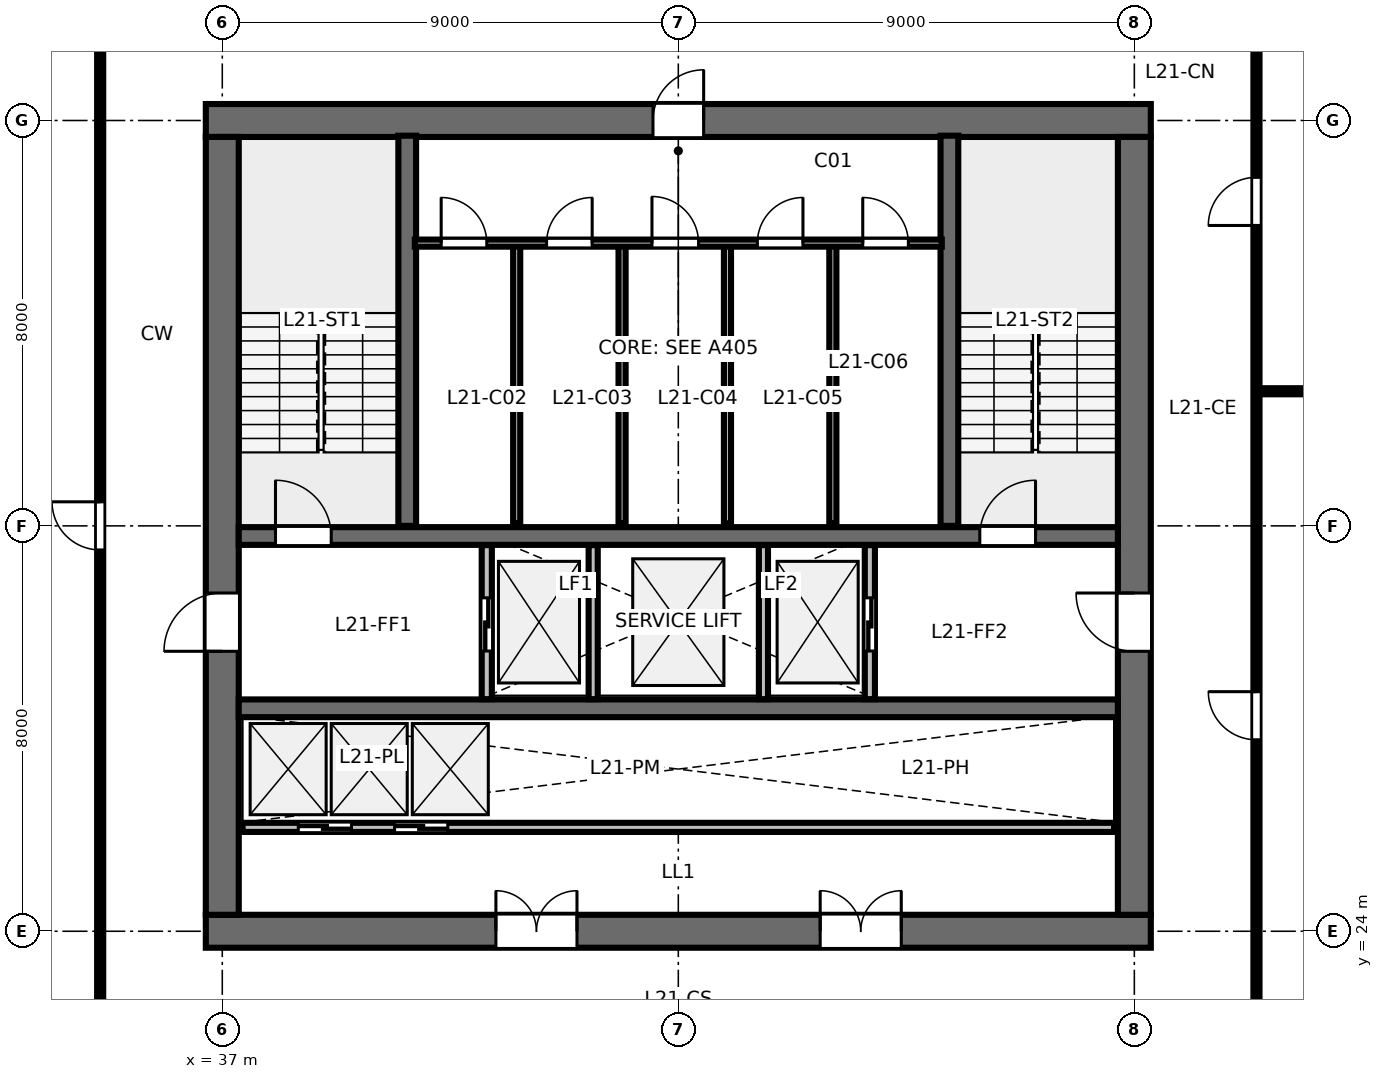
"""IFC4 building model, lengths in metres.
Left out: names, types, materials, properties, quantities, classifications, styles, units other than length and angle.
Written with IfcOpenShell. Run it as: python <this file> out.ifc"""

import sys

from ifc_helpers import new_model, si_unit, direction, frame, frame_2d, origin, place, context, subcontext, project, spatial, rectangle, extrude, element, fill, save


model = new_model("IFC4")
c1 = context("Model", 3, precision=1e-05, world=origin(), true_north=direction((0.0, 1.0)))
c2 = subcontext(c1, "Body", "Model", "MODEL_VIEW")
j1 = project(units=[si_unit("LENGTHUNIT", "METRE"), si_unit("PLANEANGLEUNIT", "RADIAN")], contexts=[c1])
p1 = place(None, origin())
s1 = spatial("IfcSite", under=j1, at=p1, CompositionType="ELEMENT")
p2 = place(p1, origin())
s2 = spatial("IfcBuilding", under=s1, at=p2, CompositionType="ELEMENT")
p3 = place(p2, frame((0.0, 0.0, 82.0)))
s3 = spatial("IfcBuildingStorey", under=s2, at=p3, CompositionType="ELEMENT", Elevation=82.0)
p4 = place(p3, frame((36.675, 24.0, 0.0), z_axis=(0.0, 0.0, 1.0), x_axis=(1.0, 0.0, 0.0)))
e1 = element("IfcWall", 1, at=p4, inside=s3, PredefinedType="SHEAR", context=c2, shape_type="SweptSolid", body=[
    extrude(rectangle(XDim=18.65, YDim=0.65, at=frame_2d((9.325, 0.0))), origin(), (0.0, 0.0, 1.0), 3.28),
])
p5 = place(p4, frame((5.725, 0.0, 0.0)))
e2 = element("IfcOpeningElement", 2, at=p5, cuts=e1, PredefinedType="OPENING", context=c2, shape_type="SweptSolid", body=[
    extrude(rectangle(XDim=1.6, YDim=2.15, at=frame_2d((0.8, 1.075))), frame((0.0, 0.335, 0.0), z_axis=(0.0, -1.0, 0.0), x_axis=(1.0, 0.0, 0.0)), (0.0, 0.0, 1.0), 0.67),
])
p6 = place(p4, frame((12.125, 0.0, 0.0)))
e3 = element("IfcOpeningElement", 3, at=p6, cuts=e1, PredefinedType="OPENING", context=c2, shape_type="SweptSolid", body=[
    extrude(rectangle(XDim=1.6, YDim=2.15, at=frame_2d((0.8, 1.075))), frame((0.0, 0.335, 0.0), z_axis=(0.0, -1.0, 0.0), x_axis=(1.0, 0.0, 0.0)), (0.0, 0.0, 1.0), 0.67),
])
p7 = place(p3, frame((36.675, 40.0, 0.0), z_axis=(0.0, 0.0, 1.0), x_axis=(1.0, 0.0, 0.0)))
e4 = element("IfcWall", 4, at=p7, inside=s3, PredefinedType="SHEAR", context=c2, shape_type="SweptSolid", body=[
    extrude(rectangle(XDim=18.65, YDim=0.65, at=frame_2d((9.325, 0.0))), origin(), (0.0, 0.0, 1.0), 3.28),
])
p8 = place(p7, frame((8.825, 0.0, 0.0)))
e5 = element("IfcOpeningElement", 5, at=p8, cuts=e4, PredefinedType="OPENING", context=c2, shape_type="SweptSolid", body=[
    extrude(rectangle(XDim=1.0, YDim=2.15, at=frame_2d((0.5, 1.075))), frame((0.0, 0.335, 0.0), z_axis=(0.0, -1.0, 0.0), x_axis=(1.0, 0.0, 0.0)), (0.0, 0.0, 1.0), 0.67),
])
p9 = place(p3, frame((37.0, 24.325, 0.0), z_axis=(0.0, 0.0, 1.0), x_axis=(0.0, 1.0, 0.0)))
e6 = element("IfcWall", 6, at=p9, inside=s3, PredefinedType="SHEAR", context=c2, shape_type="SweptSolid", body=[
    extrude(rectangle(XDim=15.35, YDim=0.65, at=frame_2d((7.675, 0.0))), origin(), (0.0, 0.0, 1.0), 3.28),
])
p10 = place(p9, frame((5.2, 0.0, 0.0)))
e7 = element("IfcOpeningElement", 7, at=p10, cuts=e6, PredefinedType="OPENING", context=c2, shape_type="SweptSolid", body=[
    extrude(rectangle(XDim=1.15, YDim=2.15, at=frame_2d((0.575, 1.075))), frame((0.0, 0.335, 0.0), z_axis=(0.0, -1.0, 0.0), x_axis=(1.0, 0.0, 0.0)), (0.0, 0.0, 1.0), 0.67),
])
p11 = place(p3, frame((55.0, 24.325, 0.0), z_axis=(0.0, 0.0, 1.0), x_axis=(0.0, 1.0, 0.0)))
e8 = element("IfcWall", 8, at=p11, inside=s3, PredefinedType="SHEAR", context=c2, shape_type="SweptSolid", body=[
    extrude(rectangle(XDim=15.35, YDim=0.65, at=frame_2d((7.675, 0.0))), origin(), (0.0, 0.0, 1.0), 3.28),
])
p12 = place(p11, frame((5.2, 0.0, 0.0)))
e9 = element("IfcOpeningElement", 9, at=p12, cuts=e8, PredefinedType="OPENING", context=c2, shape_type="SweptSolid", body=[
    extrude(rectangle(XDim=1.15, YDim=2.15, at=frame_2d((0.575, 1.075))), frame((0.0, 0.335, 0.0), z_axis=(0.0, -1.0, 0.0), x_axis=(1.0, 0.0, 0.0)), (0.0, 0.0, 1.0), 0.67),
])
p13 = place(p3, frame((37.325, 31.8, 0.0), z_axis=(0.0, 0.0, 1.0), x_axis=(1.0, 0.0, 0.0)))
e10 = element("IfcWall", 10, at=p13, inside=s3, PredefinedType="SHEAR", context=c2, shape_type="SweptSolid", body=[
    extrude(rectangle(XDim=17.35, YDim=0.35, at=frame_2d((8.675, 0.0))), origin(), (0.0, 0.0, 1.0), 3.28),
])
p14 = place(p13, frame((0.725, 0.0, 0.0)))
e11 = element("IfcOpeningElement", 11, at=p14, cuts=e10, PredefinedType="OPENING", context=c2, shape_type="SweptSolid", body=[
    extrude(rectangle(XDim=1.1, YDim=2.15, at=frame_2d((0.55, 1.075))), frame((0.0, 0.185, 0.0), z_axis=(0.0, -1.0, 0.0), x_axis=(1.0, 0.0, 0.0)), (0.0, 0.0, 1.0), 0.37),
])
p15 = place(p13, frame((14.625, 0.0, 0.0)))
e12 = element("IfcOpeningElement", 12, at=p15, cuts=e10, PredefinedType="OPENING", context=c2, shape_type="SweptSolid", body=[
    extrude(rectangle(XDim=1.1, YDim=2.15, at=frame_2d((0.55, 1.075))), frame((0.0, 0.185, 0.0), z_axis=(0.0, -1.0, 0.0), x_axis=(1.0, 0.0, 0.0)), (0.0, 0.0, 1.0), 0.37),
])
p16 = place(p3, frame((37.325, 28.4, 0.0), z_axis=(0.0, 0.0, 1.0), x_axis=(1.0, 0.0, 0.0)))
e13 = element("IfcWall", 13, at=p16, inside=s3, PredefinedType="SHEAR", context=c2, shape_type="SweptSolid", body=[
    extrude(rectangle(XDim=17.35, YDim=0.35, at=frame_2d((8.675, 0.0))), origin(), (0.0, 0.0, 1.0), 3.28),
])
for number, where, z_axis, x_axis in (
    (14, (40.65, 32.0, 0.0), (0.0, 0.0, 1.0), (0.0, 1.0, 0.0)),
    (15, (51.35, 32.0, 0.0), (0.0, 0.0, 1.0), (0.0, 1.0, 0.0)),
):
    element("IfcWall", number, at=place(p3, frame(where, z_axis=z_axis, x_axis=x_axis)), inside=s3, PredefinedType="SHEAR", context=c2, shape_type="SweptSolid", body=[
        extrude(rectangle(XDim=7.7, YDim=0.35, at=frame_2d((3.85, 0.0))), origin(), (0.0, 0.0, 1.0), 3.6),
    ])
for number, where, z_axis, x_axis in (
    (16, (42.81, 32.05, 0.0), (0.0, 0.0, 1.0), (0.0, 1.0, 0.0)),
    (17, (44.89, 32.05, 0.0), (0.0, 0.0, 1.0), (0.0, 1.0, 0.0)),
    (18, (46.97, 32.05, 0.0), (0.0, 0.0, 1.0), (0.0, 1.0, 0.0)),
    (19, (49.05, 32.05, 0.0), (0.0, 0.0, 1.0), (0.0, 1.0, 0.0)),
):
    element("IfcWall", number, at=place(p3, frame(where, z_axis=z_axis, x_axis=x_axis)), inside=s3, PredefinedType="PARTITIONING", context=c2, shape_type="SweptSolid", body=[
        extrude(rectangle(XDim=5.5, YDim=0.14, at=frame_2d((2.75, 0.0))), origin(), (0.0, 0.0, 1.0), 3.28),
    ])
p17 = place(p3, frame((40.8, 37.58, 0.0), z_axis=(0.0, 0.0, 1.0), x_axis=(1.0, 0.0, 0.0)))
e20 = element("IfcWall", 20, at=p17, inside=s3, PredefinedType="PARTITIONING", context=c2, shape_type="SweptSolid", body=[
    extrude(rectangle(XDim=10.4, YDim=0.14, at=frame_2d((5.2, 0.0))), origin(), (0.0, 0.0, 1.0), 3.28),
])
p18 = place(p17, frame((0.52, 0.0, 0.0)))
e21 = element("IfcOpeningElement", 21, at=p18, cuts=e20, PredefinedType="OPENING", context=c2, shape_type="SweptSolid", body=[
    extrude(rectangle(XDim=0.9, YDim=2.15, at=frame_2d((0.45, 1.075))), frame((0.0, 0.08, 0.0), z_axis=(0.0, -1.0, 0.0), x_axis=(1.0, 0.0, 0.0)), (0.0, 0.0, 1.0), 0.16),
])
p19 = place(p17, frame((2.6, 0.0, 0.0)))
e22 = element("IfcOpeningElement", 22, at=p19, cuts=e20, PredefinedType="OPENING", context=c2, shape_type="SweptSolid", body=[
    extrude(rectangle(XDim=0.9, YDim=2.15, at=frame_2d((0.45, 1.075))), frame((0.0, 0.08, 0.0), z_axis=(0.0, -1.0, 0.0), x_axis=(1.0, 0.0, 0.0)), (0.0, 0.0, 1.0), 0.16),
])
p20 = place(p17, frame((4.68, 0.0, 0.0)))
e23 = element("IfcOpeningElement", 23, at=p20, cuts=e20, PredefinedType="OPENING", context=c2, shape_type="SweptSolid", body=[
    extrude(rectangle(XDim=0.92, YDim=2.15, at=frame_2d((0.46, 1.075))), frame((0.0, 0.08, 0.0), z_axis=(0.0, -1.0, 0.0), x_axis=(1.0, 0.0, 0.0)), (0.0, 0.0, 1.0), 0.16),
])
p21 = place(p17, frame((6.76, 0.0, 0.0)))
e24 = element("IfcOpeningElement", 24, at=p21, cuts=e20, PredefinedType="OPENING", context=c2, shape_type="SweptSolid", body=[
    extrude(rectangle(XDim=0.9, YDim=2.15, at=frame_2d((0.45, 1.075))), frame((0.0, 0.08, 0.0), z_axis=(0.0, -1.0, 0.0), x_axis=(1.0, 0.0, 0.0)), (0.0, 0.0, 1.0), 0.16),
])
p22 = place(p17, frame((8.84, 0.0, 0.0)))
e25 = element("IfcOpeningElement", 25, at=p22, cuts=e20, PredefinedType="OPENING", context=c2, shape_type="SweptSolid", body=[
    extrude(rectangle(XDim=0.9, YDim=2.15, at=frame_2d((0.45, 1.075))), frame((0.0, 0.08, 0.0), z_axis=(0.0, -1.0, 0.0), x_axis=(1.0, 0.0, 0.0)), (0.0, 0.0, 1.0), 0.16),
])
p23 = place(p3, frame((42.22, 28.58, 0.0), z_axis=(0.0, 0.0, 1.0), x_axis=(0.0, 1.0, 0.0)))
e26 = element("IfcWall", 26, at=p23, inside=s3, PredefinedType="PARTITIONING", context=c2, shape_type="SweptSolid", body=[
    extrude(rectangle(XDim=3.04, YDim=0.2, at=frame_2d((1.52, 0.0))), origin(), (0.0, 0.0, 1.0), 3.28),
])
p24 = place(p23, frame((0.95, 0.0, 0.0)))
e27 = element("IfcOpeningElement", 27, at=p24, cuts=e26, PredefinedType="OPENING", context=c2, shape_type="SweptSolid", body=[
    extrude(rectangle(XDim=1.05, YDim=2.15, at=frame_2d((0.525, 1.075))), frame((0.0, 0.11, 0.0), z_axis=(0.0, -1.0, 0.0), x_axis=(1.0, 0.0, 0.0)), (0.0, 0.0, 1.0), 0.22),
])
p25 = place(p3, frame((49.78, 28.58, 0.0), z_axis=(0.0, 0.0, 1.0), x_axis=(0.0, 1.0, 0.0)))
e28 = element("IfcWall", 28, at=p25, inside=s3, PredefinedType="PARTITIONING", context=c2, shape_type="SweptSolid", body=[
    extrude(rectangle(XDim=3.04, YDim=0.2, at=frame_2d((1.52, 0.0))), origin(), (0.0, 0.0, 1.0), 3.28),
])
p26 = place(p25, frame((0.95, 0.0, 0.0)))
e29 = element("IfcOpeningElement", 29, at=p26, cuts=e28, PredefinedType="OPENING", context=c2, shape_type="SweptSolid", body=[
    extrude(rectangle(XDim=1.05, YDim=2.15, at=frame_2d((0.525, 1.075))), frame((0.0, 0.11, 0.0), z_axis=(0.0, -1.0, 0.0), x_axis=(1.0, 0.0, 0.0)), (0.0, 0.0, 1.0), 0.22),
])
for number, where, z_axis, x_axis in (
    (30, (44.32, 28.58, 0.0), (0.0, 0.0, 1.0), (0.0, 1.0, 0.0)),
    (31, (47.68, 28.58, 0.0), (0.0, 0.0, 1.0), (0.0, 1.0, 0.0)),
):
    element("IfcWall", number, at=place(p3, frame(where, z_axis=z_axis, x_axis=x_axis)), inside=s3, PredefinedType="PARTITIONING", context=c2, shape_type="SweptSolid", body=[
        extrude(rectangle(XDim=3.04, YDim=0.18, at=frame_2d((1.52, 0.0))), origin(), (0.0, 0.0, 1.0), 3.28),
    ])
p27 = place(p3, frame((37.4, 26.05, 0.0), z_axis=(0.0, 0.0, 1.0), x_axis=(1.0, 0.0, 0.0)))
e32 = element("IfcWall", 32, at=p27, inside=s3, PredefinedType="PARTITIONING", context=c2, shape_type="SweptSolid", body=[
    extrude(rectangle(XDim=17.2, YDim=0.18, at=frame_2d((8.6, 0.0))), origin(), (0.0, 0.0, 1.0), 3.28),
])
p28 = place(p27, frame((1.1, 0.0, 0.0)))
e33 = element("IfcOpeningElement", 33, at=p28, cuts=e32, PredefinedType="OPENING", context=c2, shape_type="SweptSolid", body=[
    extrude(rectangle(XDim=1.05, YDim=2.15, at=frame_2d((0.525, 1.075))), frame((0.0, 0.1, 0.0), z_axis=(0.0, -1.0, 0.0), x_axis=(1.0, 0.0, 0.0)), (0.0, 0.0, 1.0), 0.2),
])
p29 = place(p27, frame((3.0, 0.0, 0.0)))
e34 = element("IfcOpeningElement", 34, at=p29, cuts=e32, PredefinedType="OPENING", context=c2, shape_type="SweptSolid", body=[
    extrude(rectangle(XDim=1.05, YDim=2.15, at=frame_2d((0.525, 1.075))), frame((0.0, 0.1, 0.0), z_axis=(0.0, -1.0, 0.0), x_axis=(1.0, 0.0, 0.0)), (0.0, 0.0, 1.0), 0.2),
])
p30 = place(p3, frame((34.59, 21.65, 0.0), z_axis=(0.0, 0.0, 1.0), x_axis=(0.0, 1.0, 0.0)))
e35 = element("IfcWall", 35, at=p30, inside=s3, PredefinedType="PARTITIONING", context=c2, shape_type="SweptSolid", body=[
    extrude(rectangle(XDim=20.7, YDim=0.12, at=frame_2d((10.35, 0.0))), origin(), (0.0, 0.0, 1.0), 2.56),
])
p31 = place(p30, frame((9.875, 0.0, 0.0)))
e36 = element("IfcOpeningElement", 36, at=p31, cuts=e35, PredefinedType="OPENING", context=c2, shape_type="SweptSolid", body=[
    extrude(rectangle(XDim=0.95, YDim=2.15, at=frame_2d((0.475, 1.075))), frame((0.0, 0.07, 0.0), z_axis=(0.0, -1.0, 0.0), x_axis=(1.0, 0.0, 0.0)), (0.0, 0.0, 1.0), 0.14),
])
p32 = place(p3, frame((57.41, 34.656, 0.0), z_axis=(0.0, 0.0, 1.0), x_axis=(1.0, 0.0, 0.0)))
e37 = element("IfcWall", 37, at=p32, inside=s3, PredefinedType="PARTITIONING", context=c2, shape_type="SweptSolid", body=[
    extrude(rectangle(XDim=12.76, YDim=0.12, at=frame_2d((6.38, 0.0))), origin(), (0.0, 0.0, 1.0), 2.56),
])
p33 = place(p32, frame((1.4, 0.0, 0.0)))
e38 = element("IfcOpeningElement", 38, at=p33, cuts=e37, PredefinedType="OPENING", context=c2, shape_type="SweptSolid", body=[
    extrude(rectangle(XDim=0.9, YDim=2.15, at=frame_2d((0.45, 1.075))), frame((0.0, 0.07, 0.0), z_axis=(0.0, -1.0, 0.0), x_axis=(1.0, 0.0, 0.0)), (0.0, 0.0, 1.0), 0.14),
])
p34 = place(p3, frame((57.41, 21.65, 0.0), z_axis=(0.0, 0.0, 1.0), x_axis=(0.0, 1.0, 0.0)))
e39 = element("IfcWall", 39, at=p34, inside=s3, PredefinedType="PARTITIONING", context=c2, shape_type="SweptSolid", body=[
    extrude(rectangle(XDim=20.7, YDim=0.12, at=frame_2d((10.35, 0.0))), origin(), (0.0, 0.0, 1.0), 2.56),
])
p35 = place(p34, frame((6.128, 0.0, 0.0)))
e40 = element("IfcOpeningElement", 40, at=p35, cuts=e39, PredefinedType="OPENING", context=c2, shape_type="SweptSolid", body=[
    extrude(rectangle(XDim=0.95, YDim=2.15, at=frame_2d((0.475, 1.075))), frame((0.0, 0.07, 0.0), z_axis=(0.0, -1.0, 0.0), x_axis=(1.0, 0.0, 0.0)), (0.0, 0.0, 1.0), 0.14),
])
p36 = place(p34, frame((16.278, 0.0, 0.0)))
e41 = element("IfcOpeningElement", 41, at=p36, cuts=e39, PredefinedType="OPENING", context=c2, shape_type="SweptSolid", body=[
    extrude(rectangle(XDim=0.95, YDim=2.15, at=frame_2d((0.475, 1.075))), frame((0.0, 0.07, 0.0), z_axis=(0.0, -1.0, 0.0), x_axis=(1.0, 0.0, 0.0)), (0.0, 0.0, 1.0), 0.14),
])
p37 = place(p14, origin())
e42 = element("IfcDoor", 42, at=p37, inside=s3, OperationType="SINGLE_SWING_LEFT", PredefinedType="DOOR", context=c2, shape_type="SweptSolid", body=[
    extrude(rectangle(XDim=1.1, YDim=2.15, at=frame_2d((0.55, 1.075))), frame((0.0, 0.025, 0.0), z_axis=(0.0, -1.0, 0.0), x_axis=(1.0, 0.0, 0.0)), (0.0, 0.0, 1.0), 0.05),
])
fill(e11, e42)
p38 = place(p15, origin())
e43 = element("IfcDoor", 43, at=p38, inside=s3, OperationType="SINGLE_SWING_RIGHT", PredefinedType="DOOR", context=c2, shape_type="SweptSolid", body=[
    extrude(rectangle(XDim=1.1, YDim=2.15, at=frame_2d((0.55, 1.075))), frame((0.0, 0.025, 0.0), z_axis=(0.0, -1.0, 0.0), x_axis=(1.0, 0.0, 0.0)), (0.0, 0.0, 1.0), 0.05),
])
fill(e12, e43)
p39 = place(p8, origin())
e44 = element("IfcDoor", 44, at=p39, inside=s3, OperationType="SINGLE_SWING_RIGHT", PredefinedType="DOOR", context=c2, shape_type="SweptSolid", body=[
    extrude(rectangle(XDim=1.0, YDim=2.15, at=frame_2d((0.5, 1.075))), frame((0.0, 0.025, 0.0), z_axis=(0.0, -1.0, 0.0), x_axis=(1.0, 0.0, 0.0)), (0.0, 0.0, 1.0), 0.05),
])
fill(e5, e44)
p40 = place(p10, origin())
e45 = element("IfcDoor", 45, at=p40, inside=s3, OperationType="SINGLE_SWING_LEFT", PredefinedType="DOOR", context=c2, shape_type="SweptSolid", body=[
    extrude(rectangle(XDim=1.15, YDim=2.15, at=frame_2d((0.575, 1.075))), frame((0.0, 0.025, 0.0), z_axis=(0.0, -1.0, 0.0), x_axis=(1.0, 0.0, 0.0)), (0.0, 0.0, 1.0), 0.05),
])
fill(e7, e45)
p41 = place(p12, origin())
e46 = element("IfcDoor", 46, at=p41, inside=s3, OperationType="SINGLE_SWING_RIGHT", PredefinedType="DOOR", context=c2, shape_type="SweptSolid", body=[
    extrude(rectangle(XDim=1.15, YDim=2.15, at=frame_2d((0.575, 1.075))), frame((0.0, 0.025, 0.0), z_axis=(0.0, -1.0, 0.0), x_axis=(1.0, 0.0, 0.0)), (0.0, 0.0, 1.0), 0.05),
])
fill(e9, e46)
p42 = place(p5, origin())
e47 = element("IfcDoor", 47, at=p42, inside=s3, OperationType="DOUBLE_DOOR_SINGLE_SWING", PredefinedType="DOOR", context=c2, shape_type="SweptSolid", body=[
    extrude(rectangle(XDim=1.6, YDim=2.15, at=frame_2d((0.8, 1.075))), frame((0.0, 0.025, 0.0), z_axis=(0.0, -1.0, 0.0), x_axis=(1.0, 0.0, 0.0)), (0.0, 0.0, 1.0), 0.05),
])
fill(e2, e47)
p43 = place(p6, origin())
e48 = element("IfcDoor", 48, at=p43, inside=s3, OperationType="DOUBLE_DOOR_SINGLE_SWING", PredefinedType="DOOR", context=c2, shape_type="SweptSolid", body=[
    extrude(rectangle(XDim=1.6, YDim=2.15, at=frame_2d((0.8, 1.075))), frame((0.0, 0.025, 0.0), z_axis=(0.0, -1.0, 0.0), x_axis=(1.0, 0.0, 0.0)), (0.0, 0.0, 1.0), 0.05),
])
fill(e3, e48)
p44 = place(p18, origin())
e49 = element("IfcDoor", 49, at=p44, inside=s3, OperationType="SINGLE_SWING_LEFT", PredefinedType="DOOR", context=c2, shape_type="SweptSolid", body=[
    extrude(rectangle(XDim=0.9, YDim=2.15, at=frame_2d((0.45, 1.075))), frame((0.0, 0.025, 0.0), z_axis=(0.0, -1.0, 0.0), x_axis=(1.0, 0.0, 0.0)), (0.0, 0.0, 1.0), 0.05),
])
fill(e21, e49)
p45 = place(p19, origin())
e50 = element("IfcDoor", 50, at=p45, inside=s3, OperationType="SINGLE_SWING_RIGHT", PredefinedType="DOOR", context=c2, shape_type="SweptSolid", body=[
    extrude(rectangle(XDim=0.9, YDim=2.15, at=frame_2d((0.45, 1.075))), frame((0.0, 0.025, 0.0), z_axis=(0.0, -1.0, 0.0), x_axis=(1.0, 0.0, 0.0)), (0.0, 0.0, 1.0), 0.05),
])
fill(e22, e50)
p46 = place(p20, origin())
e51 = element("IfcDoor", 51, at=p46, inside=s3, OperationType="SINGLE_SWING_LEFT", PredefinedType="DOOR", context=c2, shape_type="SweptSolid", body=[
    extrude(rectangle(XDim=0.92, YDim=2.15, at=frame_2d((0.46, 1.075))), frame((0.0, 0.025, 0.0), z_axis=(0.0, -1.0, 0.0), x_axis=(1.0, 0.0, 0.0)), (0.0, 0.0, 1.0), 0.05),
])
fill(e23, e51)
p47 = place(p21, origin())
e52 = element("IfcDoor", 52, at=p47, inside=s3, OperationType="SINGLE_SWING_RIGHT", PredefinedType="DOOR", context=c2, shape_type="SweptSolid", body=[
    extrude(rectangle(XDim=0.9, YDim=2.15, at=frame_2d((0.45, 1.075))), frame((0.0, 0.025, 0.0), z_axis=(0.0, -1.0, 0.0), x_axis=(1.0, 0.0, 0.0)), (0.0, 0.0, 1.0), 0.05),
])
fill(e24, e52)
p48 = place(p22, origin())
e53 = element("IfcDoor", 53, at=p48, inside=s3, OperationType="SINGLE_SWING_LEFT", PredefinedType="DOOR", context=c2, shape_type="SweptSolid", body=[
    extrude(rectangle(XDim=0.9, YDim=2.15, at=frame_2d((0.45, 1.075))), frame((0.0, 0.025, 0.0), z_axis=(0.0, -1.0, 0.0), x_axis=(1.0, 0.0, 0.0)), (0.0, 0.0, 1.0), 0.05),
])
fill(e25, e53)
p49 = place(p24, origin())
e54 = element("IfcDoor", 54, at=p49, inside=s3, OperationType="SLIDING_TO_LEFT", PredefinedType="DOOR", context=c2, shape_type="SweptSolid", body=[
    extrude(rectangle(XDim=1.05, YDim=2.15, at=frame_2d((0.525, 1.075))), frame((0.0, 0.025, 0.0), z_axis=(0.0, -1.0, 0.0), x_axis=(1.0, 0.0, 0.0)), (0.0, 0.0, 1.0), 0.05),
])
fill(e27, e54)
p50 = place(p26, origin())
e55 = element("IfcDoor", 55, at=p50, inside=s3, OperationType="SLIDING_TO_RIGHT", PredefinedType="DOOR", context=c2, shape_type="SweptSolid", body=[
    extrude(rectangle(XDim=1.05, YDim=2.15, at=frame_2d((0.525, 1.075))), frame((0.0, 0.025, 0.0), z_axis=(0.0, -1.0, 0.0), x_axis=(1.0, 0.0, 0.0)), (0.0, 0.0, 1.0), 0.05),
])
fill(e29, e55)
p51 = place(p28, origin())
e56 = element("IfcDoor", 56, at=p51, inside=s3, OperationType="SLIDING_TO_LEFT", PredefinedType="DOOR", context=c2, shape_type="SweptSolid", body=[
    extrude(rectangle(XDim=1.05, YDim=2.15, at=frame_2d((0.525, 1.075))), frame((0.0, 0.025, 0.0), z_axis=(0.0, -1.0, 0.0), x_axis=(1.0, 0.0, 0.0)), (0.0, 0.0, 1.0), 0.05),
])
fill(e33, e56)
p52 = place(p29, origin())
e57 = element("IfcDoor", 57, at=p52, inside=s3, OperationType="SLIDING_TO_RIGHT", PredefinedType="DOOR", context=c2, shape_type="SweptSolid", body=[
    extrude(rectangle(XDim=1.05, YDim=2.15, at=frame_2d((0.525, 1.075))), frame((0.0, 0.025, 0.0), z_axis=(0.0, -1.0, 0.0), x_axis=(1.0, 0.0, 0.0)), (0.0, 0.0, 1.0), 0.05),
])
fill(e34, e57)
p53 = place(p31, origin())
e58 = element("IfcDoor", 58, at=p53, inside=s3, OperationType="SINGLE_SWING_RIGHT", PredefinedType="DOOR", context=c2, shape_type="SweptSolid", body=[
    extrude(rectangle(XDim=0.95, YDim=2.15, at=frame_2d((0.475, 1.075))), frame((0.0, 0.025, 0.0), z_axis=(0.0, -1.0, 0.0), x_axis=(1.0, 0.0, 0.0)), (0.0, 0.0, 1.0), 0.05),
])
fill(e36, e58)
p54 = place(p35, origin())
e59 = element("IfcDoor", 59, at=p54, inside=s3, OperationType="SINGLE_SWING_RIGHT", PredefinedType="DOOR", context=c2, shape_type="SweptSolid", body=[
    extrude(rectangle(XDim=0.95, YDim=2.15, at=frame_2d((0.475, 1.075))), frame((0.0, 0.025, 0.0), z_axis=(0.0, -1.0, 0.0), x_axis=(1.0, 0.0, 0.0)), (0.0, 0.0, 1.0), 0.05),
])
fill(e40, e59)
p55 = place(p36, origin())
e60 = element("IfcDoor", 60, at=p55, inside=s3, OperationType="SINGLE_SWING_LEFT", PredefinedType="DOOR", context=c2, shape_type="SweptSolid", body=[
    extrude(rectangle(XDim=0.95, YDim=2.15, at=frame_2d((0.475, 1.075))), frame((0.0, 0.025, 0.0), z_axis=(0.0, -1.0, 0.0), x_axis=(1.0, 0.0, 0.0)), (0.0, 0.0, 1.0), 0.05),
])
fill(e41, e60)
save(model, sys.argv[1])
